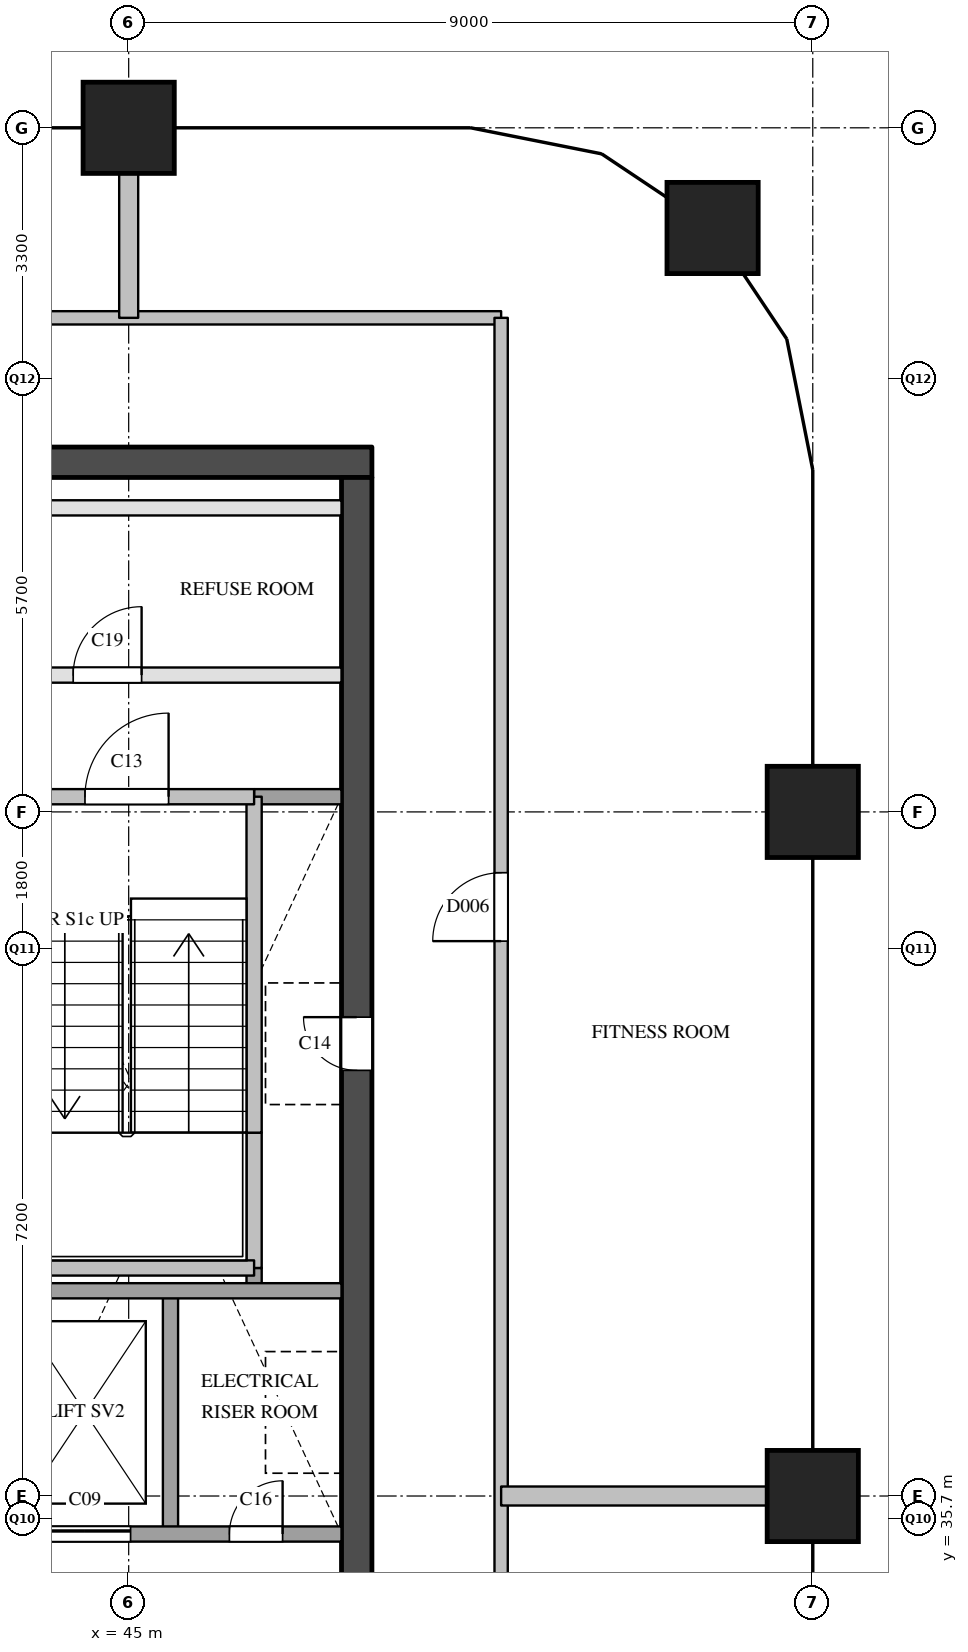
"""IFC4 building model, lengths in metres.
Left out: names, types, materials, properties, quantities, classifications, styles, units other than length and angle.
Written with IfcOpenShell. Run it as: python <this file> out.ifc"""

import sys

from ifc_helpers import new_model, si_unit, direction, frame, frame_2d, origin, origin_2d, place, context, subcontext, project, spatial, rectangle, extrude, element, fill, save


model = new_model("IFC4")
c1 = context("Model", 3, precision=1e-05, world=origin(), true_north=direction((0.0, 1.0)))
c2 = subcontext(c1, "Body", "Model", "MODEL_VIEW")
j1 = project(units=[si_unit("LENGTHUNIT", "METRE"), si_unit("PLANEANGLEUNIT", "RADIAN")], contexts=[c1])
p1 = place(None, origin())
s1 = spatial("IfcSite", under=j1, at=p1, CompositionType="ELEMENT")
p2 = place(p1, origin())
s2 = spatial("IfcBuilding", under=s1, at=p2, CompositionType="ELEMENT")
p3 = place(p2, frame((0.0, 0.0, 215.0)))
s3 = spatial("IfcBuildingStorey", under=s2, at=p3, CompositionType="ELEMENT", Elevation=215.0)
for number, where, z_axis, x_axis in (
    (1, (45.0, 54.0, 0.0), (0.0, 0.0, 1.0), (1.0, 0.0, 0.0)),
    (2, (54.0, 36.0, 0.0), (0.0, 0.0, 1.0), (1.0, 0.0, 0.0)),
    (3, (54.0, 45.0, 0.0), (0.0, 0.0, 1.0), (1.0, 0.0, 0.0)),
    (4, (52.682, 52.682, 0.0), (0.0, 0.0, 1.0), (1.0, 0.0, 0.0)),
):
    element("IfcColumn", number, at=place(p3, frame(where, z_axis=z_axis, x_axis=x_axis)), inside=s3, PredefinedType="COLUMN", context=c2, shape_type="SweptSolid", body=[
        extrude(rectangle(XDim=1.2, YDim=1.2, at=origin_2d()), origin(), (0.0, 0.0, 1.0), 3.9),
    ])
p4 = place(p3, frame((36.2, 49.6, 0.0), z_axis=(0.0, 0.0, 1.0), x_axis=(1.0, 0.0, 0.0)))
e5 = element("IfcWall", 5, at=p4, inside=s3, PredefinedType="SHEAR", context=c2, shape_type="SweptSolid", body=[
    extrude(rectangle(XDim=12.0, YDim=0.4, at=frame_2d((6.0, 0.0))), origin(), (0.0, 0.0, 1.0), 3.6),
])
p5 = place(p3, frame((48.0, 29.1, 0.0), z_axis=(0.0, 0.0, 1.0), x_axis=(0.0, 1.0, 0.0)))
e6 = element("IfcWall", 6, at=p5, inside=s3, PredefinedType="SHEAR", context=c2, shape_type="SweptSolid", body=[
    extrude(rectangle(XDim=20.3, YDim=0.4, at=frame_2d((10.15, 0.0))), origin(), (0.0, 0.0, 1.0), 3.6),
])
p6 = place(p5, frame((12.5, 0.0, 0.0)))
e7 = element("IfcOpeningElement", 7, at=p6, cuts=e6, PredefinedType="OPENING", context=c2, shape_type="SweptSolid", body=[
    extrude(rectangle(XDim=0.7, YDim=2.1, at=frame_2d((0.35, 1.05))), frame((0.0, 0.21, 0.0), z_axis=(0.0, -1.0, 0.0), x_axis=(1.0, 0.0, 0.0)), (0.0, 0.0, 1.0), 0.42),
])
p7 = place(p5, frame((3.9, 0.0, 0.0)))
e8 = element("IfcOpeningElement", 8, at=p7, cuts=e6, PredefinedType="OPENING", context=c2, shape_type="SweptSolid", body=[
    extrude(rectangle(XDim=1.8, YDim=2.1, at=frame_2d((0.9, 1.05))), frame((0.0, 0.21, 0.0), z_axis=(0.0, -1.0, 0.0), x_axis=(1.0, 0.0, 0.0)), (0.0, 0.0, 1.0), 0.42),
])
p8 = place(p3, frame((45.55, 35.5, 0.0), z_axis=(0.0, 0.0, 1.0), x_axis=(0.0, 1.0, 0.0)))
e9 = element("IfcWall", 9, at=p8, inside=s3, PredefinedType="SOLIDWALL", context=c2, shape_type="SweptSolid", body=[
    extrude(rectangle(XDim=3.2, YDim=0.2, at=frame_2d((1.6, 0.0))), origin(), (0.0, 0.0, 1.0), 3.6),
])
p9 = place(p3, frame((46.65, 38.7, 0.0), z_axis=(0.0, 0.0, 1.0), x_axis=(0.0, 1.0, 0.0)))
e10 = element("IfcWall", 10, at=p9, inside=s3, PredefinedType="SOLIDWALL", context=c2, shape_type="SweptSolid", body=[
    extrude(rectangle(XDim=0.3, YDim=0.2, at=frame_2d((0.15, 0.0))), origin(), (0.0, 0.0, 1.0), 3.6),
])
p10 = place(p3, frame((46.65, 39.0, 0.0), z_axis=(0.0, 0.0, 1.0), x_axis=(0.0, 1.0, 0.0)))
e11 = element("IfcWall", 11, at=p10, inside=s3, PredefinedType="SOLIDWALL", context=c2, shape_type="SweptSolid", body=[
    extrude(rectangle(XDim=1.78, YDim=0.2, at=frame_2d((0.89, 0.0))), origin(), (0.0, 0.0, 1.0), 3.6),
])
p11 = place(p3, frame((46.65, 40.78, 0.0), z_axis=(0.0, 0.0, 1.0), x_axis=(0.0, 1.0, 0.0)))
e12 = element("IfcWall", 12, at=p11, inside=s3, PredefinedType="SOLIDWALL", context=c2, shape_type="SweptSolid", body=[
    extrude(rectangle(XDim=4.42, YDim=0.2, at=frame_2d((2.21, 0.0))), origin(), (0.0, 0.0, 1.0), 3.6),
])
p12 = place(p3, frame((43.3, 35.5, 0.0), z_axis=(0.0, 0.0, 1.0), x_axis=(1.0, 0.0, 0.0)))
e13 = element("IfcWall", 13, at=p12, inside=s3, PredefinedType="SOLIDWALL", context=c2, shape_type="SweptSolid", body=[
    extrude(rectangle(XDim=4.5, YDim=0.2, at=frame_2d((2.25, 0.0))), origin(), (0.0, 0.0, 1.0), 3.6),
])
p13 = place(p12, frame((0.525, 0.0, 0.0)))
e14 = element("IfcOpeningElement", 14, at=p13, cuts=e13, PredefinedType="OPENING", context=c2, shape_type="SweptSolid", body=[
    extrude(rectangle(XDim=1.2, YDim=2.1, at=frame_2d((0.6, 1.05))), frame((0.0, 0.11, 0.0), z_axis=(0.0, -1.0, 0.0), x_axis=(1.0, 0.0, 0.0)), (0.0, 0.0, 1.0), 0.22),
])
p14 = place(p12, frame((3.025, 0.0, 0.0)))
e15 = element("IfcOpeningElement", 15, at=p14, cuts=e13, PredefinedType="OPENING", context=c2, shape_type="SweptSolid", body=[
    extrude(rectangle(XDim=0.7, YDim=2.1, at=frame_2d((0.35, 1.05))), frame((0.0, 0.11, 0.0), z_axis=(0.0, -1.0, 0.0), x_axis=(1.0, 0.0, 0.0)), (0.0, 0.0, 1.0), 0.22),
])
p15 = place(p3, frame((43.3, 38.7, 0.0), z_axis=(0.0, 0.0, 1.0), x_axis=(1.0, 0.0, 0.0)))
e16 = element("IfcWall", 16, at=p15, inside=s3, PredefinedType="SOLIDWALL", context=c2, shape_type="SweptSolid", body=[
    extrude(rectangle(XDim=4.5, YDim=0.2, at=frame_2d((2.25, 0.0))), origin(), (0.0, 0.0, 1.0), 3.6),
])
p16 = place(p3, frame((43.4, 39.0, 0.0), z_axis=(0.0, 0.0, 1.0), x_axis=(1.0, 0.0, 0.0)))
e17 = element("IfcWall", 17, at=p16, inside=s3, PredefinedType="SOLIDWALL", context=c2, shape_type="SweptSolid", body=[
    extrude(rectangle(XDim=3.25, YDim=0.2, at=frame_2d((1.625, 0.0))), origin(), (0.0, 0.0, 1.0), 3.6),
])
p17 = place(p3, frame((46.65, 45.2, 0.0), z_axis=(0.0, 0.0, 1.0), x_axis=(1.0, 0.0, 0.0)))
e18 = element("IfcWall", 18, at=p17, inside=s3, PredefinedType="SOLIDWALL", context=c2, shape_type="SweptSolid", body=[
    extrude(rectangle(XDim=1.15, YDim=0.2, at=frame_2d((0.575, 0.0))), origin(), (0.0, 0.0, 1.0), 3.6),
])
p18 = place(p3, frame((36.6, 45.2, 0.0), z_axis=(0.0, 0.0, 1.0), x_axis=(1.0, 0.0, 0.0)))
e19 = element("IfcWall", 19, at=p18, inside=s3, PredefinedType="SOLIDWALL", context=c2, shape_type="SweptSolid", body=[
    extrude(rectangle(XDim=10.05, YDim=0.2, at=frame_2d((5.025, 0.0))), origin(), (0.0, 0.0, 1.0), 3.6),
])
p19 = place(p18, frame((1.125, 0.0, 0.0)))
e20 = element("IfcOpeningElement", 20, at=p19, cuts=e19, PredefinedType="OPENING", context=c2, shape_type="SweptSolid", body=[
    extrude(rectangle(XDim=1.1, YDim=2.1, at=frame_2d((0.55, 1.05))), frame((0.0, 0.11, 0.0), z_axis=(0.0, -1.0, 0.0), x_axis=(1.0, 0.0, 0.0)), (0.0, 0.0, 1.0), 0.22),
])
p20 = place(p18, frame((4.475, 0.0, 0.0)))
e21 = element("IfcOpeningElement", 21, at=p20, cuts=e19, PredefinedType="OPENING", context=c2, shape_type="SweptSolid", body=[
    extrude(rectangle(XDim=1.1, YDim=2.1, at=frame_2d((0.55, 1.05))), frame((0.0, 0.11, 0.0), z_axis=(0.0, -1.0, 0.0), x_axis=(1.0, 0.0, 0.0)), (0.0, 0.0, 1.0), 0.22),
])
p21 = place(p18, frame((7.825, 0.0, 0.0)))
e22 = element("IfcOpeningElement", 22, at=p21, cuts=e19, PredefinedType="OPENING", context=c2, shape_type="SweptSolid", body=[
    extrude(rectangle(XDim=1.1, YDim=2.1, at=frame_2d((0.55, 1.05))), frame((0.0, 0.11, 0.0), z_axis=(0.0, -1.0, 0.0), x_axis=(1.0, 0.0, 0.0)), (0.0, 0.0, 1.0), 0.22),
])
p22 = place(p3, frame((36.6, 46.8, 0.0), z_axis=(0.0, 0.0, 1.0), x_axis=(1.0, 0.0, 0.0)))
e23 = element("IfcWall", 23, at=p22, inside=s3, PredefinedType="PARTITIONING", context=c2, shape_type="SweptSolid", body=[
    extrude(rectangle(XDim=11.2, YDim=0.2, at=frame_2d((5.6, 0.0))), origin(), (0.0, 0.0, 1.0), 3.6),
])
p23 = place(p22, frame((2.07, 0.0, 0.0)))
e24 = element("IfcOpeningElement", 24, at=p23, cuts=e23, PredefinedType="OPENING", context=c2, shape_type="SweptSolid", body=[
    extrude(rectangle(XDim=0.9, YDim=2.1, at=frame_2d((0.45, 1.05))), frame((0.0, 0.11, 0.0), z_axis=(0.0, -1.0, 0.0), x_axis=(1.0, 0.0, 0.0)), (0.0, 0.0, 1.0), 0.22),
])
p24 = place(p22, frame((7.67, 0.0, 0.0)))
e25 = element("IfcOpeningElement", 25, at=p24, cuts=e23, PredefinedType="OPENING", context=c2, shape_type="SweptSolid", body=[
    extrude(rectangle(XDim=0.9, YDim=2.1, at=frame_2d((0.45, 1.05))), frame((0.0, 0.11, 0.0), z_axis=(0.0, -1.0, 0.0), x_axis=(1.0, 0.0, 0.0)), (0.0, 0.0, 1.0), 0.22),
])
p25 = place(p3, frame((36.6, 49.0, 0.0), z_axis=(0.0, 0.0, 1.0), x_axis=(1.0, 0.0, 0.0)))
e26 = element("IfcWall", 26, at=p25, inside=s3, PredefinedType="PARTITIONING", context=c2, shape_type="SweptSolid", body=[
    extrude(rectangle(XDim=11.2, YDim=0.2, at=frame_2d((5.6, 0.0))), origin(), (0.0, 0.0, 1.0), 3.6),
])
p26 = place(p3, frame((34.5, 51.5, 0.0), z_axis=(0.0, 0.0, 1.0), x_axis=(1.0, 0.0, 0.0)))
e27 = element("IfcWall", 27, at=p26, inside=s3, PredefinedType="PARTITIONING", context=c2, shape_type="SweptSolid", body=[
    extrude(rectangle(XDim=15.4, YDim=0.175, at=frame_2d((7.7, 0.0))), origin(), (0.0, 0.0, 1.0), 3.6),
])
p27 = place(p26, frame((5.995, 0.0, 0.0)))
e28 = element("IfcOpeningElement", 28, at=p27, cuts=e27, PredefinedType="OPENING", context=c2, shape_type="SweptSolid", body=[
    extrude(rectangle(XDim=0.9, YDim=2.1, at=frame_2d((0.45, 1.05))), frame((0.0, 0.097, 0.0), z_axis=(0.0, -1.0, 0.0), x_axis=(1.0, 0.0, 0.0)), (0.0, 0.0, 1.0), 0.195),
])
p28 = place(p3, frame((49.9, 28.5, 0.0), z_axis=(0.0, 0.0, 1.0), x_axis=(0.0, 1.0, 0.0)))
e29 = element("IfcWall", 29, at=p28, inside=s3, PredefinedType="PARTITIONING", context=c2, shape_type="SweptSolid", body=[
    extrude(rectangle(XDim=23.0, YDim=0.175, at=frame_2d((11.5, 0.0))), origin(), (0.0, 0.0, 1.0), 3.6),
])
p29 = place(p28, frame((14.8, 0.0, 0.0)))
e30 = element("IfcOpeningElement", 30, at=p29, cuts=e29, PredefinedType="OPENING", context=c2, shape_type="SweptSolid", body=[
    extrude(rectangle(XDim=0.9, YDim=2.1, at=frame_2d((0.45, 1.05))), frame((0.0, 0.097, 0.0), z_axis=(0.0, -1.0, 0.0), x_axis=(1.0, 0.0, 0.0)), (0.0, 0.0, 1.0), 0.195),
])
p30 = place(p3, frame((49.9, 36.0, 0.0), z_axis=(0.0, 0.0, 1.0), x_axis=(1.0, 0.0, 0.0)))
e31 = element("IfcWall", 31, at=p30, inside=s3, PredefinedType="PARTITIONING", context=c2, shape_type="SweptSolid", body=[
    extrude(rectangle(XDim=4.1, YDim=0.25, at=frame_2d((2.05, 0.0))), origin(), (0.0, 0.0, 1.0), 3.6),
])
p31 = place(p3, frame((45.0, 51.5, 0.0), z_axis=(0.0, 0.0, 1.0), x_axis=(0.0, 1.0, 0.0)))
e32 = element("IfcWall", 32, at=p31, inside=s3, PredefinedType="PARTITIONING", context=c2, shape_type="SweptSolid", body=[
    extrude(rectangle(XDim=2.5, YDim=0.25, at=frame_2d((1.25, 0.0))), origin(), (0.0, 0.0, 1.0), 3.6),
])
p32 = place(p13, origin())
e33 = element("IfcDoor", 33, at=p32, inside=s3, OperationType="SLIDING_TO_LEFT", PredefinedType="DOOR", context=c2, shape_type="SweptSolid", body=[
    extrude(rectangle(XDim=1.2, YDim=2.1, at=frame_2d((0.6, 1.05))), frame((0.0, 0.025, 0.0), z_axis=(0.0, -1.0, 0.0), x_axis=(1.0, 0.0, 0.0)), (0.0, 0.0, 1.0), 0.05),
])
fill(e14, e33)
p33 = place(p21, origin())
e34 = element("IfcDoor", 34, at=p33, inside=s3, OperationType="SINGLE_SWING_RIGHT", PredefinedType="DOOR", context=c2, shape_type="SweptSolid", body=[
    extrude(rectangle(XDim=1.1, YDim=2.1, at=frame_2d((0.55, 1.05))), frame((0.0, 0.025, 0.0), z_axis=(0.0, -1.0, 0.0), x_axis=(1.0, 0.0, 0.0)), (0.0, 0.0, 1.0), 0.05),
])
fill(e22, e34)
p34 = place(p6, origin())
e35 = element("IfcDoor", 35, at=p34, inside=s3, OperationType="SINGLE_SWING_RIGHT", PredefinedType="DOOR", context=c2, shape_type="SweptSolid", body=[
    extrude(rectangle(XDim=0.7, YDim=2.1, at=frame_2d((0.35, 1.05))), frame((0.0, 0.025, 0.0), z_axis=(0.0, -1.0, 0.0), x_axis=(1.0, 0.0, 0.0)), (0.0, 0.0, 1.0), 0.05),
])
fill(e7, e35)
p35 = place(p14, origin())
e36 = element("IfcDoor", 36, at=p35, inside=s3, OperationType="SINGLE_SWING_RIGHT", PredefinedType="DOOR", context=c2, shape_type="SweptSolid", body=[
    extrude(rectangle(XDim=0.7, YDim=2.1, at=frame_2d((0.35, 1.05))), frame((0.0, 0.025, 0.0), z_axis=(0.0, -1.0, 0.0), x_axis=(1.0, 0.0, 0.0)), (0.0, 0.0, 1.0), 0.05),
])
fill(e15, e36)
p36 = place(p24, origin())
e37 = element("IfcDoor", 37, at=p36, inside=s3, OperationType="SINGLE_SWING_RIGHT", PredefinedType="DOOR", context=c2, shape_type="SweptSolid", body=[
    extrude(rectangle(XDim=0.9, YDim=2.1, at=frame_2d((0.45, 1.05))), frame((0.0, 0.025, 0.0), z_axis=(0.0, -1.0, 0.0), x_axis=(1.0, 0.0, 0.0)), (0.0, 0.0, 1.0), 0.05),
])
fill(e25, e37)
p37 = place(p29, origin())
e38 = element("IfcDoor", 38, at=p37, inside=s3, OperationType="SINGLE_SWING_LEFT", PredefinedType="DOOR", context=c2, shape_type="SweptSolid", body=[
    extrude(rectangle(XDim=0.9, YDim=2.1, at=frame_2d((0.45, 1.05))), frame((0.0, 0.025, 0.0), z_axis=(0.0, -1.0, 0.0), x_axis=(1.0, 0.0, 0.0)), (0.0, 0.0, 1.0), 0.05),
])
fill(e30, e38)
save(model, sys.argv[1])
